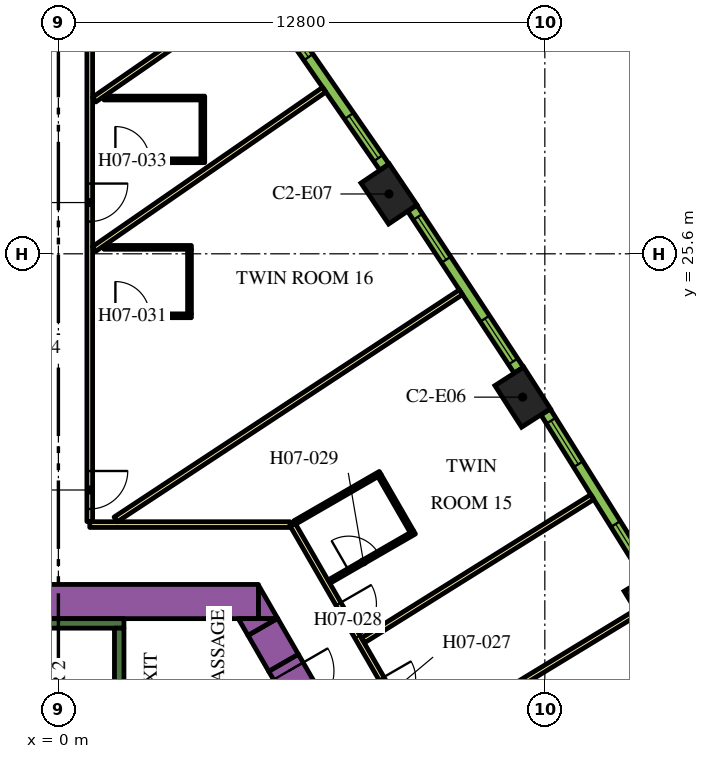
"""IFC4 building model, lengths in metres.
Left out: names, types, materials, properties, quantities, classifications, styles, units other than length and angle.
Written with IfcOpenShell. Run it as: python <this file> out.ifc"""

import sys

from ifc_helpers import new_model, si_unit, direction, frame, frame_2d, origin, origin_2d, place, context, subcontext, project, spatial, polyline, rectangle, outline, extrude, element, fill, save


model = new_model("IFC4")
c1 = context("Model", 3, precision=1e-05, world=origin(), true_north=direction((0.0, 1.0)))
c2 = subcontext(c1, "Body", "Model", "MODEL_VIEW")
j1 = project(units=[si_unit("LENGTHUNIT", "METRE"), si_unit("PLANEANGLEUNIT", "RADIAN")], contexts=[c1])
p1 = place(None, origin())
s1 = spatial("IfcSite", under=j1, at=p1, CompositionType="ELEMENT")
p2 = place(p1, origin())
s2 = spatial("IfcBuilding", under=s1, at=p2, CompositionType="ELEMENT")
p3 = place(p2, frame((0.0, 0.0, 95.4)))
s3 = spatial("IfcBuildingStorey", under=s2, at=p3, CompositionType="ELEMENT", Elevation=95.4)
for number, where, z_axis, x_axis in (
    (1, (15.609, 16.402, 0.0), (0.0, 0.0, 1.0), (-0.52, 0.854, 0.0)),
    (2, (12.217, 21.828, 0.0), (0.0, 0.0, 1.0), (-0.54, 0.842, 0.0)),
    (3, (8.699, 27.174, 0.0), (0.0, 0.0, 1.0), (-0.559, 0.829, 0.0)),
):
    element("IfcColumn", number, at=place(p3, frame(where, z_axis=z_axis, x_axis=x_axis)), inside=s3, PredefinedType="COLUMN", context=c2, shape_type="SweptSolid", body=[
        extrude(rectangle(XDim=1.3, YDim=0.9, at=origin_2d()), origin(), (0.0, 0.0, 1.0), 3.9),
    ])
p4 = place(p3, frame((-4.224, 16.45, 0.0), z_axis=(0.0, 0.0, 1.0), x_axis=(1.0, 0.0, 0.0)))
e4 = element("IfcWall", 4, at=p4, inside=s3, PredefinedType="SOLIDWALL", context=c2, shape_type="SweptSolid", body=[
    extrude(rectangle(XDim=9.488, YDim=0.9, at=frame_2d((4.744, 0.0))), origin(), (0.0, 0.0, 1.0), 3.9),
])
p5 = place(p3, origin())
e5 = element("IfcWall", 5, at=p5, inside=s3, PredefinedType="SOLIDWALL", context=c2, shape_type="SweptSolid", body=[
    extrude(outline(polyline([(5.265, 16.0), (5.265, 16.88), (5.773, 16.0), (5.265, 16.0)])), origin(), (0.0, 0.0, 1.0), 3.9),
])
p6 = place(p3, frame((5.926, 14.836, 0.0), z_axis=(0.0, 0.0, 1.0), x_axis=(-0.500076735116, 0.865981096212, 0.0)))
e6 = element("IfcWall", 6, at=p6, inside=s3, PredefinedType="SOLIDWALL", context=c2, shape_type="SweptSolid", body=[
    extrude(rectangle(XDim=1.094, YDim=0.9, at=frame_2d((0.547, 0.0))), origin(), (0.0, 0.0, 1.0), 3.9),
])
e7 = element("IfcWall", 7, at=p5, inside=s3, PredefinedType="SOLIDWALL", context=c2, shape_type="SweptSolid", body=[
    extrude(outline(polyline([(4.734, 16.0), (5.75, 16.0), (4.988, 15.56), (4.734, 16.0)])), origin(), (0.0, 0.0, 1.0), 3.9),
])
p7 = place(p3, frame((-1.725, 15.875, 0.0), z_axis=(0.0, 0.0, 1.0), x_axis=(1.0, 0.0, 0.0)))
e8 = element("IfcWall", 8, at=p7, inside=s3, PredefinedType="SOLIDWALL", context=c2, shape_type="SweptSolid", body=[
    extrude(rectangle(XDim=3.45, YDim=0.25, at=frame_2d((1.725, 0.0))), origin(), (0.0, 0.0, 1.0), 3.9),
])
p8 = place(p3, frame((1.6, 8.95, 0.0), z_axis=(0.0, 0.0, 1.0), x_axis=(0.0, 1.0, 0.0)))
e9 = element("IfcWall", 9, at=p8, inside=s3, PredefinedType="SOLIDWALL", context=c2, shape_type="SweptSolid", body=[
    extrude(rectangle(XDim=6.8, YDim=0.25, at=frame_2d((3.4, 0.0))), origin(), (0.0, 0.0, 1.0), 3.9),
])
p9 = place(p3, frame((5.926, 14.836, 0.0), z_axis=(0.0, 0.0, 1.0), x_axis=(0.500062241894, -0.865989465428, 0.0)))
e10 = element("IfcWall", 10, at=p9, inside=s3, PredefinedType="SOLIDWALL", context=c2, shape_type="SweptSolid", body=[
    extrude(rectangle(XDim=1.7, YDim=0.9, at=frame_2d((0.85, 0.0))), origin(), (0.0, 0.0, 1.0), 3.9),
])
p10 = place(p9, frame((0.25, 0.0, 0.0)))
e11 = element("IfcOpeningElement", 11, at=p10, cuts=e10, PredefinedType="OPENING", context=c2, shape_type="SweptSolid", body=[
    extrude(rectangle(XDim=1.2, YDim=2.1, at=frame_2d((0.6, 1.05))), frame((0.0, 0.46, 0.0), z_axis=(0.0, -1.0, 0.0), x_axis=(1.0, 0.0, 0.0)), (0.0, 0.0, 1.0), 0.92),
])
p11 = place(p3, frame((6.163, 18.475, 0.0), z_axis=(0.0, 0.0, 1.0), x_axis=(0.500001317485, -0.866024643133, 0.0)))
e12 = element("IfcWall", 12, at=p11, inside=s3, PredefinedType="PARTITIONING", context=c2, shape_type="SweptSolid", body=[
    extrude(rectangle(XDim=25.767, YDim=0.15, at=frame_2d((12.883, 0.0))), origin(), (0.0, 0.0, 1.0), 2.75),
])
p12 = place(p11, frame((24.241, 0.0, 0.0)))
e13 = element("IfcOpeningElement", 13, at=p12, cuts=e12, PredefinedType="OPENING", context=c2, shape_type="SweptSolid", body=[
    extrude(rectangle(XDim=1.0, YDim=2.1, at=frame_2d((0.5, 1.05))), frame((0.0, 0.085, 0.0), z_axis=(0.0, -1.0, 0.0), x_axis=(1.0, 0.0, 0.0)), (0.0, 0.0, 1.0), 0.17),
])
p13 = place(p11, frame((13.144, 0.0, 0.0)))
e14 = element("IfcOpeningElement", 14, at=p13, cuts=e12, PredefinedType="OPENING", context=c2, shape_type="SweptSolid", body=[
    extrude(rectangle(XDim=1.0, YDim=2.1, at=frame_2d((0.5, 1.05))), frame((0.0, 0.085, 0.0), z_axis=(0.0, -1.0, 0.0), x_axis=(1.0, 0.0, 0.0)), (0.0, 0.0, 1.0), 0.17),
])
p14 = place(p11, frame((11.592, 0.0, 0.0)))
e15 = element("IfcOpeningElement", 15, at=p14, cuts=e12, PredefinedType="OPENING", context=c2, shape_type="SweptSolid", body=[
    extrude(rectangle(XDim=1.1, YDim=2.1, at=frame_2d((0.55, 1.05))), frame((0.0, 0.085, 0.0), z_axis=(0.0, -1.0, 0.0), x_axis=(1.0, 0.0, 0.0)), (0.0, 0.0, 1.0), 0.17),
])
p15 = place(p11, frame((4.674, 0.0, 0.0)))
e16 = element("IfcOpeningElement", 16, at=p15, cuts=e12, PredefinedType="OPENING", context=c2, shape_type="SweptSolid", body=[
    extrude(rectangle(XDim=0.9, YDim=2.1, at=frame_2d((0.45, 1.05))), frame((0.0, 0.085, 0.0), z_axis=(0.0, -1.0, 0.0), x_axis=(1.0, 0.0, 0.0)), (0.0, 0.0, 1.0), 0.17),
])
p16 = place(p11, frame((2.411, 0.0, 0.0)))
e17 = element("IfcOpeningElement", 17, at=p16, cuts=e12, PredefinedType="OPENING", context=c2, shape_type="SweptSolid", body=[
    extrude(rectangle(XDim=1.0, YDim=2.1, at=frame_2d((0.5, 1.05))), frame((0.0, 0.085, 0.0), z_axis=(0.0, -1.0, 0.0), x_axis=(1.0, 0.0, 0.0)), (0.0, 0.0, 1.0), 0.17),
])
p17 = place(p3, frame((0.825, 18.475, 0.0), z_axis=(0.0, 0.0, 1.0), x_axis=(1.0, 0.0, 0.0)))
e18 = element("IfcWall", 18, at=p17, inside=s3, PredefinedType="PARTITIONING", context=c2, shape_type="SweptSolid", body=[
    extrude(rectangle(XDim=5.268, YDim=0.15, at=frame_2d((2.634, 0.0))), origin(), (0.0, 0.0, 1.0), 2.75),
])
p18 = place(p3, frame((0.825, 32.098, 0.0), z_axis=(0.0, 0.0, 1.0), x_axis=(0.0, -1.0, 0.0)))
e19 = element("IfcWall", 19, at=p18, inside=s3, PredefinedType="PARTITIONING", context=c2, shape_type="SweptSolid", body=[
    extrude(rectangle(XDim=13.543, YDim=0.15, at=frame_2d((6.772, 0.0))), origin(), (0.0, 0.0, 1.0), 2.75),
])
p19 = place(p18, frame((12.213, 0.0, 0.0)))
e20 = element("IfcOpeningElement", 20, at=p19, cuts=e19, PredefinedType="OPENING", context=c2, shape_type="SweptSolid", body=[
    extrude(rectangle(XDim=1.0, YDim=2.1, at=frame_2d((0.5, 1.05))), frame((0.0, 0.085, 0.0), z_axis=(0.0, -1.0, 0.0), x_axis=(1.0, 0.0, 0.0)), (0.0, 0.0, 1.0), 0.17),
])
p20 = place(p18, frame((4.65, 0.0, 0.0)))
e21 = element("IfcOpeningElement", 21, at=p20, cuts=e19, PredefinedType="OPENING", context=c2, shape_type="SweptSolid", body=[
    extrude(rectangle(XDim=1.0, YDim=2.1, at=frame_2d((0.5, 1.05))), frame((0.0, 0.085, 0.0), z_axis=(0.0, -1.0, 0.0), x_axis=(1.0, 0.0, 0.0)), (0.0, 0.0, 1.0), 0.17),
])
p21 = place(p3, frame((6.994, 29.917, 0.0), z_axis=(0.0, 0.0, 1.0), x_axis=(-0.822255462494, -0.569118576747, 0.0)))
e22 = element("IfcWall", 22, at=p21, inside=s3, PredefinedType="PARTITIONING", context=c2, shape_type="SweptSolid", body=[
    extrude(rectangle(XDim=7.362, YDim=0.15, at=frame_2d((3.681, 0.0))), origin(), (0.0, 0.0, 1.0), 2.75),
])
p22 = place(p3, frame((10.592, 24.589, 0.0), z_axis=(0.0, 0.0, 1.0), x_axis=(-0.835337323748, -0.549737715236, 0.0)))
e23 = element("IfcWall", 23, at=p22, inside=s3, PredefinedType="PARTITIONING", context=c2, shape_type="SweptSolid", body=[
    extrude(rectangle(XDim=10.875, YDim=0.15, at=frame_2d((5.438, 0.0))), origin(), (0.0, 0.0, 1.0), 2.75),
])
p23 = place(p3, frame((4.649, 32.223, 0.0), z_axis=(0.0, 0.0, 1.0), x_axis=(-0.822262349475, -0.569108626394, 0.0)))
e24 = element("IfcWall", 24, at=p23, inside=s3, PredefinedType="PARTITIONING", context=c2, shape_type="SweptSolid", body=[
    extrude(rectangle(XDim=4.51, YDim=0.15, at=frame_2d((2.255, 0.0))), origin(), (0.0, 0.0, 1.0), 2.75),
])
p24 = place(p3, frame((14.049, 19.2, 0.0), z_axis=(0.0, 0.0, 1.0), x_axis=(-0.847955867271, -0.530066832731, 0.0)))
e25 = element("IfcWall", 25, at=p24, inside=s3, PredefinedType="PARTITIONING", context=c2, shape_type="SweptSolid", body=[
    extrude(rectangle(XDim=7.111, YDim=0.15, at=frame_2d((3.556, 0.0))), origin(), (0.0, 0.0, 1.0), 2.75),
])
p25 = place(p3, frame((15.225, 16.167, 0.0), z_axis=(0.0, 0.0, 1.0), x_axis=(-0.854088713274, -0.520127359266, 0.0)))
e26 = element("IfcWall", 26, at=p25, inside=s3, PredefinedType="PARTITIONING", context=c2, shape_type="SweptSolid", body=[
    extrude(rectangle(XDim=6.611, YDim=0.15, at=frame_2d((3.305, 0.0))), origin(), (0.0, 0.0, 1.0), 2.75),
])
p26 = place(p3, frame((7.118, 16.971, 0.0), z_axis=(0.0, 0.0, 1.0), x_axis=(0.866021400173, 0.500006934395, 0.0)))
e27 = element("IfcWall", 27, at=p26, inside=s3, PredefinedType="PARTITIONING", context=c2, shape_type="SweptSolid", body=[
    extrude(rectangle(XDim=2.6, YDim=0.1, at=frame_2d((1.3, 0.0))), origin(), (0.0, 0.0, 1.0), 2.75),
])
p27 = place(p26, frame((0.6, 0.0, 0.0)))
e28 = element("IfcOpeningElement", 28, at=p27, cuts=e27, PredefinedType="OPENING", context=c2, shape_type="SweptSolid", body=[
    extrude(rectangle(XDim=0.9, YDim=2.1, at=frame_2d((0.45, 1.05))), frame((0.0, 0.06, 0.0), z_axis=(0.0, -1.0, 0.0), x_axis=(1.0, 0.0, 0.0)), (0.0, 0.0, 1.0), 0.12),
])
p28 = place(p3, frame((9.302, 18.289, 0.0), z_axis=(0.0, 0.0, 1.0), x_axis=(-0.500062241894, 0.865989465428, 0.0)))
e29 = element("IfcWall", 29, at=p28, inside=s3, PredefinedType="PARTITIONING", context=c2, shape_type="SweptSolid", body=[
    extrude(rectangle(XDim=1.7, YDim=0.1, at=frame_2d((0.85, 0.0))), origin(), (0.0, 0.0, 1.0), 2.75),
])
p29 = place(p3, frame((6.218, 18.53, 0.0), z_axis=(0.0, 0.0, 1.0), x_axis=(0.865997922154, 0.500047596559, 0.0)))
e30 = element("IfcWall", 30, at=p29, inside=s3, PredefinedType="PARTITIONING", context=c2, shape_type="SweptSolid", body=[
    extrude(rectangle(XDim=2.6, YDim=0.1, at=frame_2d((1.3, 0.0))), origin(), (0.0, 0.0, 1.0), 2.75),
])
p30 = place(p3, frame((0.9, 23.969, 0.0), z_axis=(0.0, 0.0, 1.0), x_axis=(1.0, 0.0, 0.0)))
e31 = element("IfcWall", 31, at=p30, inside=s3, PredefinedType="PARTITIONING", context=c2, shape_type="SweptSolid", body=[
    extrude(rectangle(XDim=2.6, YDim=0.1, at=frame_2d((1.3, 0.0))), origin(), (0.0, 0.0, 1.0), 2.75),
])
p31 = place(p30, frame((0.6, 0.0, 0.0)))
e32 = element("IfcOpeningElement", 32, at=p31, cuts=e31, PredefinedType="OPENING", context=c2, shape_type="SweptSolid", body=[
    extrude(rectangle(XDim=0.9, YDim=2.1, at=frame_2d((0.45, 1.05))), frame((0.0, 0.06, 0.0), z_axis=(0.0, -1.0, 0.0), x_axis=(1.0, 0.0, 0.0)), (0.0, 0.0, 1.0), 0.12),
])
p32 = place(p3, frame((3.45, 24.019, 0.0), z_axis=(0.0, 0.0, 1.0), x_axis=(0.0, 1.0, 0.0)))
e33 = element("IfcWall", 33, at=p32, inside=s3, PredefinedType="PARTITIONING", context=c2, shape_type="SweptSolid", body=[
    extrude(rectangle(XDim=1.7, YDim=0.1, at=frame_2d((0.85, 0.0))), origin(), (0.0, 0.0, 1.0), 2.75),
])
p33 = place(p3, frame((1.2, 25.769, 0.0), z_axis=(0.0, 0.0, 1.0), x_axis=(1.0, 0.0, 0.0)))
e34 = element("IfcWall", 34, at=p33, inside=s3, PredefinedType="PARTITIONING", context=c2, shape_type="SweptSolid", body=[
    extrude(rectangle(XDim=2.3, YDim=0.1, at=frame_2d((1.15, 0.0))), origin(), (0.0, 0.0, 1.0), 2.75),
])
p34 = place(p3, frame((0.9, 28.048, 0.0), z_axis=(0.0, 0.0, 1.0), x_axis=(1.0, 0.0, 0.0)))
e35 = element("IfcWall", 35, at=p34, inside=s3, PredefinedType="PARTITIONING", context=c2, shape_type="SweptSolid", body=[
    extrude(rectangle(XDim=2.95, YDim=0.1, at=frame_2d((1.475, 0.0))), origin(), (0.0, 0.0, 1.0), 2.75),
])
p35 = place(p34, frame((0.6, 0.0, 0.0)))
e36 = element("IfcOpeningElement", 36, at=p35, cuts=e35, PredefinedType="OPENING", context=c2, shape_type="SweptSolid", body=[
    extrude(rectangle(XDim=0.9, YDim=2.1, at=frame_2d((0.45, 1.05))), frame((0.0, 0.06, 0.0), z_axis=(0.0, -1.0, 0.0), x_axis=(1.0, 0.0, 0.0)), (0.0, 0.0, 1.0), 0.12),
])
p36 = place(p3, frame((3.8, 28.098, 0.0), z_axis=(0.0, 0.0, 1.0), x_axis=(0.0, 1.0, 0.0)))
e37 = element("IfcWall", 37, at=p36, inside=s3, PredefinedType="PARTITIONING", context=c2, shape_type="SweptSolid", body=[
    extrude(rectangle(XDim=1.55, YDim=0.1, at=frame_2d((0.775, 0.0))), origin(), (0.0, 0.0, 1.0), 2.75),
])
p37 = place(p3, frame((1.2, 29.698, 0.0), z_axis=(0.0, 0.0, 1.0), x_axis=(1.0, 0.0, 0.0)))
e38 = element("IfcWall", 38, at=p37, inside=s3, PredefinedType="PARTITIONING", context=c2, shape_type="SweptSolid", body=[
    extrude(rectangle(XDim=2.65, YDim=0.1, at=frame_2d((1.325, 0.0))), origin(), (0.0, 0.0, 1.0), 2.75),
])
p38 = place(p3, frame((15.524, 17.114, 0.0), z_axis=(0.0, 0.0, 1.0), x_axis=(-0.530072082134, 0.847952585787, 0.0)))
e39 = element("IfcWall", 39, at=p38, inside=s3, PredefinedType="SOLIDWALL", context=c2, shape_type="SweptSolid", body=[
    extrude(rectangle(XDim=5.1, YDim=0.29, at=frame_2d((2.55, 0.0))), origin(), (0.0, 0.0, 1.0), 3.65),
])
p39 = place(p38, frame((0.273, 0.0, 0.9)))
e40 = element("IfcOpeningElement", 40, at=p39, cuts=e39, PredefinedType="OPENING", context=c2, shape_type="SweptSolid", body=[
    extrude(rectangle(XDim=1.35, YDim=2.15, at=frame_2d((0.675, 1.075))), frame((0.0, 0.155, 0.0), z_axis=(0.0, -1.0, 0.0), x_axis=(1.0, 0.0, 0.0)), (0.0, 0.0, 1.0), 0.31),
])
p40 = place(p38, frame((3.478, 0.0, 0.9)))
e41 = element("IfcOpeningElement", 41, at=p40, cuts=e39, PredefinedType="OPENING", context=c2, shape_type="SweptSolid", body=[
    extrude(rectangle(XDim=1.35, YDim=2.15, at=frame_2d((0.675, 1.075))), frame((0.0, 0.155, 0.0), z_axis=(0.0, -1.0, 0.0), x_axis=(1.0, 0.0, 0.0)), (0.0, 0.0, 1.0), 0.31),
])
p41 = place(p3, frame((12.115, 22.539, 0.0), z_axis=(0.0, 0.0, 1.0), x_axis=(-0.549741341923, 0.835334937005, 0.0)))
e42 = element("IfcWall", 42, at=p41, inside=s3, PredefinedType="SOLIDWALL", context=c2, shape_type="SweptSolid", body=[
    extrude(rectangle(XDim=5.1, YDim=0.29, at=frame_2d((2.55, 0.0))), origin(), (0.0, 0.0, 1.0), 3.65),
])
p42 = place(p41, frame((0.273, 0.0, 0.9)))
e43 = element("IfcOpeningElement", 43, at=p42, cuts=e42, PredefinedType="OPENING", context=c2, shape_type="SweptSolid", body=[
    extrude(rectangle(XDim=1.35, YDim=2.15, at=frame_2d((0.675, 1.075))), frame((0.0, 0.155, 0.0), z_axis=(0.0, -1.0, 0.0), x_axis=(1.0, 0.0, 0.0)), (0.0, 0.0, 1.0), 0.31),
])
p43 = place(p41, frame((3.478, 0.0, 0.9)))
e44 = element("IfcOpeningElement", 44, at=p43, cuts=e42, PredefinedType="OPENING", context=c2, shape_type="SweptSolid", body=[
    extrude(rectangle(XDim=1.35, YDim=2.15, at=frame_2d((0.675, 1.075))), frame((0.0, 0.155, 0.0), z_axis=(0.0, -1.0, 0.0), x_axis=(1.0, 0.0, 0.0)), (0.0, 0.0, 1.0), 0.31),
])
p44 = place(p3, frame((8.58, 27.882, 0.0), z_axis=(0.0, 0.0, 1.0), x_axis=(-0.569113019126, 0.822259309136, 0.0)))
e45 = element("IfcWall", 45, at=p44, inside=s3, PredefinedType="SOLIDWALL", context=c2, shape_type="SweptSolid", body=[
    extrude(rectangle(XDim=5.107, YDim=0.29, at=frame_2d((2.553, 0.0))), origin(), (0.0, 0.0, 1.0), 3.65),
])
p45 = place(p44, frame((0.285, 0.0, 0.9)))
e46 = element("IfcOpeningElement", 46, at=p45, cuts=e45, PredefinedType="OPENING", context=c2, shape_type="SweptSolid", body=[
    extrude(rectangle(XDim=1.35, YDim=2.15, at=frame_2d((0.675, 1.075))), frame((0.0, 0.155, 0.0), z_axis=(0.0, -1.0, 0.0), x_axis=(1.0, 0.0, 0.0)), (0.0, 0.0, 1.0), 0.31),
])
p46 = place(p44, frame((3.516, 0.0, 0.9)))
e47 = element("IfcOpeningElement", 47, at=p46, cuts=e45, PredefinedType="OPENING", context=c2, shape_type="SweptSolid", body=[
    extrude(rectangle(XDim=1.35, YDim=2.15, at=frame_2d((0.675, 1.075))), frame((0.0, 0.155, 0.0), z_axis=(0.0, -1.0, 0.0), x_axis=(1.0, 0.0, 0.0)), (0.0, 0.0, 1.0), 0.31),
])
p47 = place(p10, origin())
e48 = element("IfcDoor", 48, at=p47, inside=s3, OperationType="SINGLE_SWING_LEFT", PredefinedType="DOOR", context=c2, shape_type="SweptSolid", body=[
    extrude(rectangle(XDim=1.2, YDim=2.1, at=frame_2d((0.6, 1.05))), frame((0.0, 0.025, 0.0), z_axis=(0.0, -1.0, 0.0), x_axis=(1.0, 0.0, 0.0)), (0.0, 0.0, 1.0), 0.05),
])
fill(e11, e48)
p48 = place(p15, origin())
e49 = element("IfcDoor", 49, at=p48, inside=s3, OperationType="SINGLE_SWING_RIGHT", PredefinedType="DOOR", context=c2, shape_type="SweptSolid", body=[
    extrude(rectangle(XDim=0.9, YDim=2.1, at=frame_2d((0.45, 1.05))), frame((0.0, 0.025, 0.0), z_axis=(0.0, -1.0, 0.0), x_axis=(1.0, 0.0, 0.0)), (0.0, 0.0, 1.0), 0.05),
])
fill(e16, e49)
p49 = place(p16, origin())
e50 = element("IfcDoor", 50, at=p49, inside=s3, OperationType="SINGLE_SWING_RIGHT", PredefinedType="DOOR", context=c2, shape_type="SweptSolid", body=[
    extrude(rectangle(XDim=1.0, YDim=2.1, at=frame_2d((0.5, 1.05))), frame((0.0, 0.025, 0.0), z_axis=(0.0, -1.0, 0.0), x_axis=(1.0, 0.0, 0.0)), (0.0, 0.0, 1.0), 0.05),
])
fill(e17, e50)
p50 = place(p27, origin())
e51 = element("IfcDoor", 51, at=p50, inside=s3, OperationType="SINGLE_SWING_RIGHT", PredefinedType="DOOR", context=c2, shape_type="SweptSolid", body=[
    extrude(rectangle(XDim=0.9, YDim=2.1, at=frame_2d((0.45, 1.05))), frame((0.0, 0.025, 0.0), z_axis=(0.0, -1.0, 0.0), x_axis=(1.0, 0.0, 0.0)), (0.0, 0.0, 1.0), 0.05),
])
fill(e28, e51)
p51 = place(p19, origin())
e52 = element("IfcDoor", 52, at=p51, inside=s3, OperationType="SINGLE_SWING_RIGHT", PredefinedType="DOOR", context=c2, shape_type="SweptSolid", body=[
    extrude(rectangle(XDim=1.0, YDim=2.1, at=frame_2d((0.5, 1.05))), frame((0.0, 0.025, 0.0), z_axis=(0.0, -1.0, 0.0), x_axis=(1.0, 0.0, 0.0)), (0.0, 0.0, 1.0), 0.05),
])
fill(e20, e52)
p52 = place(p31, origin())
e53 = element("IfcDoor", 53, at=p52, inside=s3, OperationType="SINGLE_SWING_LEFT", PredefinedType="DOOR", context=c2, shape_type="SweptSolid", body=[
    extrude(rectangle(XDim=0.9, YDim=2.1, at=frame_2d((0.45, 1.05))), frame((0.0, 0.025, 0.0), z_axis=(0.0, -1.0, 0.0), x_axis=(1.0, 0.0, 0.0)), (0.0, 0.0, 1.0), 0.05),
])
fill(e32, e53)
p53 = place(p20, origin())
e54 = element("IfcDoor", 54, at=p53, inside=s3, OperationType="SINGLE_SWING_RIGHT", PredefinedType="DOOR", context=c2, shape_type="SweptSolid", body=[
    extrude(rectangle(XDim=1.0, YDim=2.1, at=frame_2d((0.5, 1.05))), frame((0.0, 0.025, 0.0), z_axis=(0.0, -1.0, 0.0), x_axis=(1.0, 0.0, 0.0)), (0.0, 0.0, 1.0), 0.05),
])
fill(e21, e54)
p54 = place(p35, origin())
e55 = element("IfcDoor", 55, at=p54, inside=s3, OperationType="SINGLE_SWING_LEFT", PredefinedType="DOOR", context=c2, shape_type="SweptSolid", body=[
    extrude(rectangle(XDim=0.9, YDim=2.1, at=frame_2d((0.45, 1.05))), frame((0.0, 0.025, 0.0), z_axis=(0.0, -1.0, 0.0), x_axis=(1.0, 0.0, 0.0)), (0.0, 0.0, 1.0), 0.05),
])
fill(e36, e55)
p55 = place(p39, origin())
e56 = element("IfcWindow", 56, at=p55, inside=s3, PartitioningType="DOUBLE_PANEL_VERTICAL", PredefinedType="WINDOW", context=c2, shape_type="SweptSolid", body=[
    extrude(rectangle(XDim=1.35, YDim=2.15, at=frame_2d((0.675, 1.075))), frame((0.0, 0.015, 0.0), z_axis=(0.0, -1.0, 0.0), x_axis=(1.0, 0.0, 0.0)), (0.0, 0.0, 1.0), 0.06),
])
fill(e40, e56)
p56 = place(p40, origin())
e57 = element("IfcWindow", 57, at=p56, inside=s3, PartitioningType="DOUBLE_PANEL_VERTICAL", PredefinedType="WINDOW", context=c2, shape_type="SweptSolid", body=[
    extrude(rectangle(XDim=1.35, YDim=2.15, at=frame_2d((0.675, 1.075))), frame((0.0, 0.015, 0.0), z_axis=(0.0, -1.0, 0.0), x_axis=(1.0, 0.0, 0.0)), (0.0, 0.0, 1.0), 0.06),
])
fill(e41, e57)
p57 = place(p42, origin())
e58 = element("IfcWindow", 58, at=p57, inside=s3, PartitioningType="DOUBLE_PANEL_VERTICAL", PredefinedType="WINDOW", context=c2, shape_type="SweptSolid", body=[
    extrude(rectangle(XDim=1.35, YDim=2.15, at=frame_2d((0.675, 1.075))), frame((0.0, 0.015, 0.0), z_axis=(0.0, -1.0, 0.0), x_axis=(1.0, 0.0, 0.0)), (0.0, 0.0, 1.0), 0.06),
])
fill(e43, e58)
p58 = place(p43, origin())
e59 = element("IfcWindow", 59, at=p58, inside=s3, PartitioningType="DOUBLE_PANEL_VERTICAL", PredefinedType="WINDOW", context=c2, shape_type="SweptSolid", body=[
    extrude(rectangle(XDim=1.35, YDim=2.15, at=frame_2d((0.675, 1.075))), frame((0.0, 0.015, 0.0), z_axis=(0.0, -1.0, 0.0), x_axis=(1.0, 0.0, 0.0)), (0.0, 0.0, 1.0), 0.06),
])
fill(e44, e59)
p59 = place(p45, origin())
e60 = element("IfcWindow", 60, at=p59, inside=s3, PartitioningType="DOUBLE_PANEL_VERTICAL", PredefinedType="WINDOW", context=c2, shape_type="SweptSolid", body=[
    extrude(rectangle(XDim=1.35, YDim=2.15, at=frame_2d((0.675, 1.075))), frame((0.0, 0.015, 0.0), z_axis=(0.0, -1.0, 0.0), x_axis=(1.0, 0.0, 0.0)), (0.0, 0.0, 1.0), 0.06),
])
fill(e46, e60)
p60 = place(p46, origin())
e61 = element("IfcWindow", 61, at=p60, inside=s3, PartitioningType="DOUBLE_PANEL_VERTICAL", PredefinedType="WINDOW", context=c2, shape_type="SweptSolid", body=[
    extrude(rectangle(XDim=1.35, YDim=2.15, at=frame_2d((0.675, 1.075))), frame((0.0, 0.015, 0.0), z_axis=(0.0, -1.0, 0.0), x_axis=(1.0, 0.0, 0.0)), (0.0, 0.0, 1.0), 0.06),
])
fill(e47, e61)
save(model, sys.argv[1])
